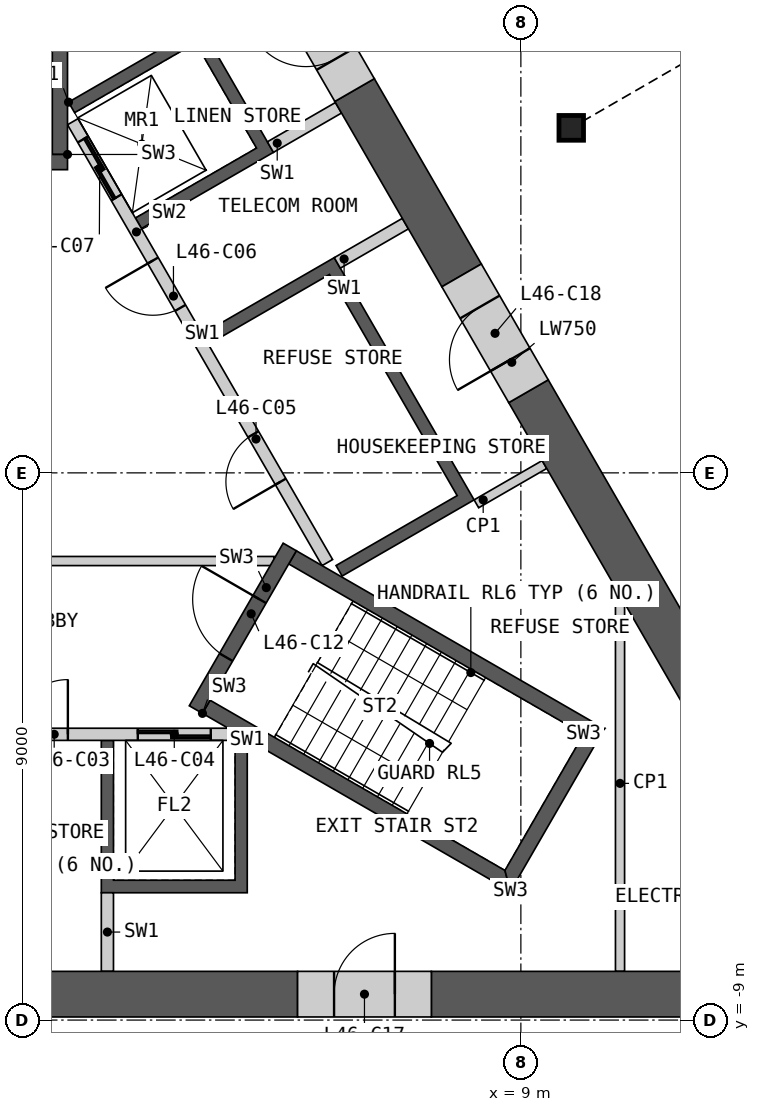
"""IFC4 building model, lengths in metres.
Left out: names, types, materials, properties, quantities, classifications, styles, units other than length and angle.
Written with IfcOpenShell. Run it as: python <this file> out.ifc"""

import sys

from ifc_helpers import new_model, si_unit, direction, frame, frame_2d, origin, origin_2d, place, context, subcontext, project, spatial, polyline, rectangle, i_section, outline, extrude, element, fill, save


model = new_model("IFC4")
c1 = context("Model", 3, precision=1e-05, world=origin(), true_north=direction((0.0, 1.0)))
c2 = subcontext(c1, "Body", "Model", "MODEL_VIEW")
j1 = project(units=[si_unit("LENGTHUNIT", "METRE"), si_unit("PLANEANGLEUNIT", "RADIAN")], contexts=[c1])
p1 = place(None, origin())
s1 = spatial("IfcSite", under=j1, at=p1, CompositionType="ELEMENT")
p2 = place(p1, origin())
s2 = spatial("IfcBuilding", under=s1, at=p2, CompositionType="ELEMENT")
p3 = place(p2, frame((0.0, 0.0, 208.8)))
s3 = spatial("IfcBuildingStorey", under=s2, at=p3, CompositionType="ELEMENT", Elevation=208.8)
p4 = place(p3, frame((9.828, 5.675, 0.0), z_axis=(0.0, 0.0, 1.0), x_axis=(1.0, 0.0, 0.0)))
e1 = element("IfcColumn", 1, at=p4, inside=s3, PredefinedType="COLUMN", context=c2, shape_type="SweptSolid", body=[
    extrude(i_section(OverallWidth=0.404, OverallDepth=0.407, WebThickness=0.027, FlangeThickness=0.044, at=origin_2d()), origin(), (0.0, 0.0, 1.0), 3.6),
])
p5 = place(p3, origin())
e2 = element("IfcWall", 2, at=p5, inside=s3, PredefinedType="SHEAR", context=c2, shape_type="SweptSolid", body=[
    extrude(outline(polyline([(4.5, -4.4), (4.5, -6.906), (2.1, -6.906), (2.1, -4.4), (2.3, -4.4), (2.3, -6.7), (4.3, -6.7), (4.3, -4.4), (4.5, -4.4)])), origin(), (0.0, 0.0, 1.0), 3.25),
])
p6 = place(p3, frame((-4.187, -4.3, 0.0), z_axis=(0.0, 0.0, 1.0), x_axis=(1.0, 0.0, 0.0)))
e3 = element("IfcWall", 3, at=p6, inside=s3, PredefinedType="SOLIDWALL", context=c2, shape_type="SweptSolid", body=[
    extrude(rectangle(XDim=8.373, YDim=0.2, at=frame_2d((4.187, 0.0))), origin(), (0.0, 0.0, 1.0), 3.25),
])
p7 = place(p6, frame((0.287, 0.0, 0.0)))
e4 = element("IfcOpeningElement", 4, at=p7, cuts=e3, PredefinedType="OPENING", context=c2, shape_type="SweptSolid", body=[
    extrude(rectangle(XDim=1.2, YDim=2.1, at=frame_2d((0.6, 1.05))), frame((0.0, 0.11, 0.0), z_axis=(0.0, -1.0, 0.0), x_axis=(1.0, 0.0, 0.0)), (0.0, 0.0, 1.0), 0.22),
])
p8 = place(p6, frame((2.387, 0.0, 0.0)))
e5 = element("IfcOpeningElement", 5, at=p8, cuts=e3, PredefinedType="OPENING", context=c2, shape_type="SweptSolid", body=[
    extrude(rectangle(XDim=1.4, YDim=2.1, at=frame_2d((0.7, 1.05))), frame((0.0, 0.11, 0.0), z_axis=(0.0, -1.0, 0.0), x_axis=(1.0, 0.0, 0.0)), (0.0, 0.0, 1.0), 0.22),
])
p9 = place(p6, frame((4.837, 0.0, 0.0)))
e6 = element("IfcOpeningElement", 6, at=p9, cuts=e3, PredefinedType="OPENING", context=c2, shape_type="SweptSolid", body=[
    extrude(rectangle(XDim=0.9, YDim=2.1, at=frame_2d((0.45, 1.05))), frame((0.0, 0.11, 0.0), z_axis=(0.0, -1.0, 0.0), x_axis=(1.0, 0.0, 0.0)), (0.0, 0.0, 1.0), 0.22),
])
p10 = place(p6, frame((6.887, 0.0, 0.0)))
e7 = element("IfcOpeningElement", 7, at=p10, cuts=e3, PredefinedType="OPENING", context=c2, shape_type="SweptSolid", body=[
    extrude(rectangle(XDim=1.2, YDim=2.1, at=frame_2d((0.6, 1.05))), frame((0.0, 0.11, 0.0), z_axis=(0.0, -1.0, 0.0), x_axis=(1.0, 0.0, 0.0)), (0.0, 0.0, 1.0), 0.22),
])
p11 = place(p3, frame((2.2, -6.906, 0.0), z_axis=(0.0, 0.0, 1.0), x_axis=(0.0, -1.0, 0.0)))
e8 = element("IfcWall", 8, at=p11, inside=s3, PredefinedType="SHEAR", context=c2, shape_type="SweptSolid", body=[
    extrude(rectangle(XDim=1.293, YDim=0.2, at=frame_2d((0.646, 0.0))), origin(), (0.0, 0.0, 1.0), 3.25),
])
p12 = place(p3, origin())
e9 = element("IfcWall", 9, at=p12, inside=s3, PredefinedType="SHEAR", context=c2, shape_type="SweptSolid", body=[
    extrude(outline(polyline([(1.561, 6.097), (3.731, 7.35), (4.931, 5.272), (2.76, 4.019), (2.66, 4.192), (4.652, 5.342), (3.652, 7.074), (1.66, 5.924), (1.561, 6.097)])), origin(), (0.0, 0.0, 1.0), 3.25),
])
p13 = place(p3, origin())
e10 = element("IfcWall", 10, at=p13, inside=s3, PredefinedType="SHEAR", context=c2, shape_type="SweptSolid", body=[
    extrude(outline(polyline([(3.76, 2.287), (5.931, 3.54), (8.231, -0.444), (6.061, -1.697), (5.96, -1.524), (7.952, -0.374), (5.852, 3.263), (3.861, 2.113), (3.76, 2.287)])), origin(), (0.0, 0.0, 1.0), 3.25),
])
p14 = place(p3, frame((5.817, -1.476, 0.0), z_axis=(0.0, 0.0, 1.0), x_axis=(-0.500002616675, 0.866023893041, 0.0)))
e11 = element("IfcWall", 11, at=p14, inside=s3, PredefinedType="SOLIDWALL", context=c2, shape_type="SweptSolid", body=[
    extrude(rectangle(XDim=8.373, YDim=0.2, at=frame_2d((4.187, 0.0))), origin(), (0.0, 0.0, 1.0), 3.25),
])
p15 = place(p14, frame((1.537, 0.0, 0.0)))
e12 = element("IfcOpeningElement", 12, at=p15, cuts=e11, PredefinedType="OPENING", context=c2, shape_type="SweptSolid", body=[
    extrude(rectangle(XDim=0.9, YDim=2.1, at=frame_2d((0.45, 1.05))), frame((0.0, 0.11, 0.0), z_axis=(0.0, -1.0, 0.0), x_axis=(1.0, 0.0, 0.0)), (0.0, 0.0, 1.0), 0.22),
])
p16 = place(p14, frame((4.837, 0.0, 0.0)))
e13 = element("IfcOpeningElement", 13, at=p16, cuts=e11, PredefinedType="OPENING", context=c2, shape_type="SweptSolid", body=[
    extrude(rectangle(XDim=0.9, YDim=2.1, at=frame_2d((0.45, 1.05))), frame((0.0, 0.11, 0.0), z_axis=(0.0, -1.0, 0.0), x_axis=(1.0, 0.0, 0.0)), (0.0, 0.0, 1.0), 0.22),
])
p17 = place(p14, frame((6.937, 0.0, 0.0)))
e14 = element("IfcOpeningElement", 14, at=p17, cuts=e11, PredefinedType="OPENING", context=c2, shape_type="SweptSolid", body=[
    extrude(rectangle(XDim=1.1, YDim=2.1, at=frame_2d((0.55, 1.05))), frame((0.0, 0.11, 0.0), z_axis=(0.0, -1.0, 0.0), x_axis=(1.0, 0.0, 0.0)), (0.0, 0.0, 1.0), 0.22),
])
p18 = place(p3, frame((5.981, 3.453, 0.0), z_axis=(0.0, 0.0, 1.0), x_axis=(0.865968639725, 0.500098305348, 0.0)))
e15 = element("IfcWall", 15, at=p18, inside=s3, PredefinedType="SHEAR", context=c2, shape_type="SweptSolid", body=[
    extrude(rectangle(XDim=1.293, YDim=0.2, at=frame_2d((0.646, 0.0))), origin(), (0.0, 0.0, 1.0), 3.25),
])
p19 = place(p3, frame((4.881, 5.358, 0.0), z_axis=(0.0, 0.0, 1.0), x_axis=(0.866084958089, 0.499896834728, 0.0)))
e16 = element("IfcWall", 16, at=p19, inside=s3, PredefinedType="SHEAR", context=c2, shape_type="SweptSolid", body=[
    extrude(rectangle(XDim=1.293, YDim=0.2, at=frame_2d((0.646, 0.0))), origin(), (0.0, 0.0, 1.0), 3.25),
])
p20 = place(p3, frame((-4.941, -1.45, 0.0), z_axis=(0.0, 0.0, 1.0), x_axis=(1.0, 0.0, 0.0)))
e17 = element("IfcWall", 17, at=p20, inside=s3, PredefinedType="PARTITIONING", context=c2, shape_type="SweptSolid", body=[
    extrude(rectangle(XDim=9.882, YDim=0.15, at=frame_2d((4.941, 0.0))), origin(), (0.0, 0.0, 1.0), 3.25),
])
p21 = place(p20, frame((4.391, 0.0, 0.0)))
e18 = element("IfcOpeningElement", 18, at=p21, cuts=e17, PredefinedType="OPENING", context=c2, shape_type="SweptSolid", body=[
    extrude(rectangle(XDim=1.1, YDim=2.1, at=frame_2d((0.55, 1.05))), frame((0.0, 0.085, 0.0), z_axis=(0.0, -1.0, 0.0), x_axis=(1.0, 0.0, 0.0)), (0.0, 0.0, 1.0), 0.17),
])
p22 = place(p3, origin())
e19 = element("IfcWall", 19, at=p22, inside=s3, PredefinedType="SHEAR", context=c2, shape_type="SweptSolid", body=[
    extrude(outline(polyline([(3.763, -3.956), (8.83, -6.881), (8.738, -6.539), (3.888, -3.739), (3.763, -3.956)])), origin(), (0.0, 0.0, 1.0), 3.25),
])
p23 = place(p3, origin())
e20 = element("IfcWall", 20, at=p23, inside=s3, PredefinedType="SHEAR", context=c2, shape_type="SweptSolid", body=[
    extrude(outline(polyline([(8.83, -6.881), (10.374, -4.206), (10.032, -4.298), (8.738, -6.539), (8.83, -6.881)])), origin(), (0.0, 0.0, 1.0), 3.25),
])
p24 = place(p3, origin())
e21 = element("IfcWall", 21, at=p24, inside=s3, PredefinedType="SHEAR", context=c2, shape_type="SweptSolid", body=[
    extrude(outline(polyline([(10.032, -4.298), (10.374, -4.206), (5.307, -1.281), (5.182, -1.498), (10.032, -4.298)])), origin(), (0.0, 0.0, 1.0), 3.25),
])
p25 = place(p3, frame((3.655, -3.893, 0.0), z_axis=(0.0, 0.0, 1.0), x_axis=(0.499982516597, 0.866035497597, 0.0)))
e22 = element("IfcWall", 22, at=p25, inside=s3, PredefinedType="SHEAR", context=c2, shape_type="SweptSolid", body=[
    extrude(rectangle(XDim=3.088, YDim=0.25, at=frame_2d((1.544, 0.0))), origin(), (0.0, 0.0, 1.0), 3.25),
])
p26 = place(p25, frame((0.994, 0.0, 0.0)))
e23 = element("IfcOpeningElement", 23, at=p26, cuts=e22, PredefinedType="OPENING", context=c2, shape_type="SweptSolid", body=[
    extrude(rectangle(XDim=1.1, YDim=2.1, at=frame_2d((0.55, 1.05))), frame((0.0, 0.135, 0.0), z_axis=(0.0, -1.0, 0.0), x_axis=(1.0, 0.0, 0.0)), (0.0, 0.0, 1.0), 0.27),
])
p27 = place(p3, origin())
e24 = element("IfcWall", 24, at=p27, inside=s3, PredefinedType="SHEAR", context=c2, shape_type="SweptSolid", body=[
    extrude(outline(polyline([(1.544, 5.237), (1.544, 11.087), (1.294, 10.837), (1.294, 5.237), (1.544, 5.237)])), origin(), (0.0, 0.0, 1.0), 3.25),
])
p28 = place(p3, frame((1.544, 5.112, 0.0), z_axis=(0.0, 0.0, 1.0), x_axis=(-1.0, 0.0, 0.0)))
e25 = element("IfcWall", 25, at=p28, inside=s3, PredefinedType="SHEAR", context=c2, shape_type="SweptSolid", body=[
    extrude(rectangle(XDim=3.088, YDim=0.25, at=frame_2d((1.544, 0.0))), origin(), (0.0, 0.0, 1.0), 3.25),
])
p29 = place(p28, frame((0.994, 0.0, 0.0)))
e26 = element("IfcOpeningElement", 26, at=p29, cuts=e25, PredefinedType="OPENING", context=c2, shape_type="SweptSolid", body=[
    extrude(rectangle(XDim=1.1, YDim=2.1, at=frame_2d((0.55, 1.05))), frame((0.0, 0.135, 0.0), z_axis=(0.0, -1.0, 0.0), x_axis=(1.0, 0.0, 0.0)), (0.0, 0.0, 1.0), 0.27),
])
p30 = place(p3, frame((8.268, -0.509, 0.0), z_axis=(0.0, 0.0, 1.0), x_axis=(0.866003189247, 0.500038474733, 0.0)))
e27 = element("IfcWall", 27, at=p30, inside=s3, PredefinedType="PARTITIONING", context=c2, shape_type="SweptSolid", body=[
    extrude(rectangle(XDim=1.293, YDim=0.15, at=frame_2d((0.646, 0.0))), origin(), (0.0, 0.0, 1.0), 3.25),
])
p31 = place(p3, frame((10.631, -8.199, 0.0), z_axis=(0.0, 0.0, 1.0), x_axis=(0.0, 1.0, 0.0)))
e28 = element("IfcWall", 28, at=p31, inside=s3, PredefinedType="PARTITIONING", context=c2, shape_type="SweptSolid", body=[
    extrude(rectangle(XDim=6.184, YDim=0.15, at=frame_2d((3.092, 0.0))), origin(), (0.0, 0.0, 1.0), 3.25),
])
p32 = place(p3, frame((7.528, -8.574, 0.0), z_axis=(0.0, 0.0, 1.0), x_axis=(1.0, 0.0, 0.0)))
e29 = element("IfcWall", 29, at=p32, inside=s3, PredefinedType="SHEAR", context=c2, shape_type="SweptSolid", body=[
    extrude(rectangle(XDim=6.673, YDim=0.75, at=frame_2d((3.336, 0.0))), origin(), (0.0, 0.0, 1.0), 3.25),
])
p33 = place(p3, frame((-1.078, -8.574, 0.0), z_axis=(0.0, 0.0, 1.0), x_axis=(1.0, 0.0, 0.0)))
e30 = element("IfcWall", 30, at=p33, inside=s3, PredefinedType="SHEAR", context=c2, shape_type="SweptSolid", body=[
    extrude(rectangle(XDim=6.406, YDim=0.75, at=frame_2d((3.203, 0.0))), origin(), (0.0, 0.0, 1.0), 3.25),
])
p34 = place(p3, frame((12.228, -4.032, 0.0), z_axis=(0.0, 0.0, 1.0), x_axis=(-0.499993760127, 0.866029006347, 0.0)))
e31 = element("IfcWall", 31, at=p34, inside=s3, PredefinedType="SHEAR", context=c2, shape_type="SweptSolid", body=[
    extrude(rectangle(XDim=6.206, YDim=0.75, at=frame_2d((3.103, 0.0))), origin(), (0.0, 0.0, 1.0), 3.25),
])
p35 = place(p3, frame((8.025, 3.248, 0.0), z_axis=(0.0, 0.0, 1.0), x_axis=(-0.499958618571, 0.866049294045, 0.0)))
e32 = element("IfcWall", 32, at=p35, inside=s3, PredefinedType="SHEAR", context=c2, shape_type="SweptSolid", body=[
    extrude(rectangle(XDim=3.52, YDim=0.75, at=frame_2d((1.76, 0.0))), origin(), (0.0, 0.0, 1.0), 3.25),
])
p36 = place(p3, frame((5.328, -8.574, 0.0), z_axis=(0.0, 0.0, 1.0), x_axis=(1.0, 0.0, 0.0)))
e33 = element("IfcWall", 33, at=p36, inside=s3, PredefinedType="SHEAR", context=c2, shape_type="SweptSolid", body=[
    extrude(rectangle(XDim=2.2, YDim=0.75, at=frame_2d((1.1, 0.0))), origin(), (0.0, 0.0, 1.0), 3.25),
])
p37 = place(p36, frame((0.6, 0.0, 0.0)))
e34 = element("IfcOpeningElement", 34, at=p37, cuts=e33, PredefinedType="OPENING", context=c2, shape_type="SweptSolid", body=[
    extrude(rectangle(XDim=1.0, YDim=2.1, at=frame_2d((0.5, 1.05))), frame((0.0, 0.385, 0.0), z_axis=(0.0, -1.0, 0.0), x_axis=(1.0, 0.0, 0.0)), (0.0, 0.0, 1.0), 0.77),
])
p38 = place(p3, frame((9.125, 1.343, 0.0), z_axis=(0.0, 0.0, 1.0), x_axis=(-0.499946605688, 0.86605622881, 0.0)))
e35 = element("IfcWall", 35, at=p38, inside=s3, PredefinedType="SHEAR", context=c2, shape_type="SweptSolid", body=[
    extrude(rectangle(XDim=2.2, YDim=0.75, at=frame_2d((1.1, 0.0))), origin(), (0.0, 0.0, 1.0), 3.25),
])
p39 = place(p38, frame((0.6, 0.0, 0.0)))
e36 = element("IfcOpeningElement", 36, at=p39, cuts=e35, PredefinedType="OPENING", context=c2, shape_type="SweptSolid", body=[
    extrude(rectangle(XDim=1.0, YDim=2.1, at=frame_2d((0.5, 1.05))), frame((0.0, 0.385, 0.0), z_axis=(0.0, -1.0, 0.0), x_axis=(1.0, 0.0, 0.0)), (0.0, 0.0, 1.0), 0.77),
])
p40 = place(p3, frame((6.265, 6.296, 0.0), z_axis=(0.0, 0.0, 1.0), x_axis=(-0.500029011134, 0.866008653551, 0.0)))
e37 = element("IfcWall", 37, at=p40, inside=s3, PredefinedType="SHEAR", context=c2, shape_type="SweptSolid", body=[
    extrude(rectangle(XDim=2.16, YDim=0.75, at=frame_2d((1.08, 0.0))), origin(), (0.0, 0.0, 1.0), 3.25),
])
p41 = place(p40, frame((0.6, 0.0, 0.0)))
e38 = element("IfcOpeningElement", 38, at=p41, cuts=e37, PredefinedType="OPENING", context=c2, shape_type="SweptSolid", body=[
    extrude(rectangle(XDim=1.0, YDim=2.1, at=frame_2d((0.5, 1.05))), frame((0.0, 0.385, 0.0), z_axis=(0.0, -1.0, 0.0), x_axis=(1.0, 0.0, 0.0)), (0.0, 0.0, 1.0), 0.77),
])
p42 = place(p3, frame((5.377, 19.385, 0.0), z_axis=(0.0, 0.0, 1.0), x_axis=(0.500000757641, -0.86602496636, 0.0)))
e39 = element("IfcWall", 39, at=p42, inside=s3, PredefinedType="PARTITIONING", context=c2, shape_type="SweptSolid", body=[
    extrude(rectangle(XDim=28.198, YDim=0.2, at=frame_2d((14.099, 0.0))), origin(), (0.0, 0.0, 1.0), 3.25),
])
p43 = place(p42, frame((25.345, 0.0, 0.0)))
e40 = element("IfcOpeningElement", 40, at=p43, cuts=e39, PredefinedType="OPENING", context=c2, shape_type="SweptSolid", body=[
    extrude(rectangle(XDim=1.8, YDim=2.1, at=frame_2d((0.9, 1.05))), frame((0.0, 0.11, 0.0), z_axis=(0.0, -1.0, 0.0), x_axis=(1.0, 0.0, 0.0)), (0.0, 0.0, 1.0), 0.22),
])
p44 = place(p42, frame((19.621, 0.0, 0.0)))
e41 = element("IfcOpeningElement", 41, at=p44, cuts=e39, PredefinedType="OPENING", context=c2, shape_type="SweptSolid", body=[
    extrude(rectangle(XDim=1.0, YDim=2.1, at=frame_2d((0.5, 1.05))), frame((0.0, 0.11, 0.0), z_axis=(0.0, -1.0, 0.0), x_axis=(1.0, 0.0, 0.0)), (0.0, 0.0, 1.0), 0.22),
])
p45 = place(p42, frame((16.409, 0.0, 0.0)))
e42 = element("IfcOpeningElement", 42, at=p45, cuts=e39, PredefinedType="OPENING", context=c2, shape_type="SweptSolid", body=[
    extrude(rectangle(XDim=1.1, YDim=2.1, at=frame_2d((0.55, 1.05))), frame((0.0, 0.11, 0.0), z_axis=(0.0, -1.0, 0.0), x_axis=(1.0, 0.0, 0.0)), (0.0, 0.0, 1.0), 0.22),
])
p46 = place(p42, frame((1.452, 0.0, 0.0)))
e43 = element("IfcOpeningElement", 43, at=p46, cuts=e39, PredefinedType="OPENING", context=c2, shape_type="SweptSolid", body=[
    extrude(rectangle(XDim=0.95, YDim=2.1, at=frame_2d((0.475, 1.05))), frame((0.0, 0.11, 0.0), z_axis=(0.0, -1.0, 0.0), x_axis=(1.0, 0.0, 0.0)), (0.0, 0.0, 1.0), 0.22),
])
p47 = place(p9, origin())
e44 = element("IfcDoor", 44, at=p47, inside=s3, OperationType="SINGLE_SWING_RIGHT", PredefinedType="DOOR", context=c2, shape_type="SweptSolid", body=[
    extrude(rectangle(XDim=0.9, YDim=2.1, at=frame_2d((0.45, 1.05))), frame((0.0, 0.025, 0.0), z_axis=(0.0, -1.0, 0.0), x_axis=(1.0, 0.0, 0.0)), (0.0, 0.0, 1.0), 0.05),
])
fill(e6, e44)
p48 = place(p10, origin())
e45 = element("IfcDoor", 45, at=p48, inside=s3, OperationType="SLIDING_TO_LEFT", PredefinedType="DOOR", context=c2, shape_type="SweptSolid", body=[
    extrude(rectangle(XDim=1.2, YDim=2.1, at=frame_2d((0.6, 1.05))), frame((0.0, 0.025, 0.0), z_axis=(0.0, -1.0, 0.0), x_axis=(1.0, 0.0, 0.0)), (0.0, 0.0, 1.0), 0.05),
])
fill(e7, e45)
p49 = place(p15, origin())
e46 = element("IfcDoor", 46, at=p49, inside=s3, OperationType="SINGLE_SWING_LEFT", PredefinedType="DOOR", context=c2, shape_type="SweptSolid", body=[
    extrude(rectangle(XDim=0.9, YDim=2.1, at=frame_2d((0.45, 1.05))), frame((0.0, 0.025, 0.0), z_axis=(0.0, -1.0, 0.0), x_axis=(1.0, 0.0, 0.0)), (0.0, 0.0, 1.0), 0.05),
])
fill(e12, e46)
p50 = place(p16, origin())
e47 = element("IfcDoor", 47, at=p50, inside=s3, OperationType="SINGLE_SWING_RIGHT", PredefinedType="DOOR", context=c2, shape_type="SweptSolid", body=[
    extrude(rectangle(XDim=0.9, YDim=2.1, at=frame_2d((0.45, 1.05))), frame((0.0, 0.025, 0.0), z_axis=(0.0, -1.0, 0.0), x_axis=(1.0, 0.0, 0.0)), (0.0, 0.0, 1.0), 0.05),
])
fill(e13, e47)
p51 = place(p17, origin())
e48 = element("IfcDoor", 48, at=p51, inside=s3, OperationType="SLIDING_TO_LEFT", PredefinedType="DOOR", context=c2, shape_type="SweptSolid", body=[
    extrude(rectangle(XDim=1.1, YDim=2.1, at=frame_2d((0.55, 1.05))), frame((0.0, 0.025, 0.0), z_axis=(0.0, -1.0, 0.0), x_axis=(1.0, 0.0, 0.0)), (0.0, 0.0, 1.0), 0.05),
])
fill(e14, e48)
p52 = place(p26, origin())
e49 = element("IfcDoor", 49, at=p52, inside=s3, OperationType="SINGLE_SWING_RIGHT", PredefinedType="DOOR", context=c2, shape_type="SweptSolid", body=[
    extrude(rectangle(XDim=1.1, YDim=2.1, at=frame_2d((0.55, 1.05))), frame((0.0, 0.025, 0.0), z_axis=(0.0, -1.0, 0.0), x_axis=(1.0, 0.0, 0.0)), (0.0, 0.0, 1.0), 0.05),
])
fill(e23, e49)
p53 = place(p37, origin())
e50 = element("IfcDoor", 50, at=p53, inside=s3, OperationType="SINGLE_SWING_RIGHT", PredefinedType="DOOR", context=c2, shape_type="SweptSolid", body=[
    extrude(rectangle(XDim=1.0, YDim=2.1, at=frame_2d((0.5, 1.05))), frame((0.0, 0.13, 0.0), z_axis=(0.0, -1.0, 0.0), x_axis=(1.0, 0.0, 0.0)), (0.0, 0.0, 1.0), 0.05),
])
fill(e34, e50)
p54 = place(p39, origin())
e51 = element("IfcDoor", 51, at=p54, inside=s3, OperationType="SINGLE_SWING_LEFT", PredefinedType="DOOR", context=c2, shape_type="SweptSolid", body=[
    extrude(rectangle(XDim=1.0, YDim=2.1, at=frame_2d((0.5, 1.05))), frame((0.0, 0.13, 0.0), z_axis=(0.0, -1.0, 0.0), x_axis=(1.0, 0.0, 0.0)), (0.0, 0.0, 1.0), 0.05),
])
fill(e36, e51)
p55 = place(p41, origin())
e52 = element("IfcDoor", 52, at=p55, inside=s3, OperationType="SINGLE_SWING_RIGHT", PredefinedType="DOOR", context=c2, shape_type="SweptSolid", body=[
    extrude(rectangle(XDim=1.0, YDim=2.1, at=frame_2d((0.5, 1.05))), frame((0.0, 0.13, 0.0), z_axis=(0.0, -1.0, 0.0), x_axis=(1.0, 0.0, 0.0)), (0.0, 0.0, 1.0), 0.05),
])
fill(e38, e52)
save(model, sys.argv[1])
